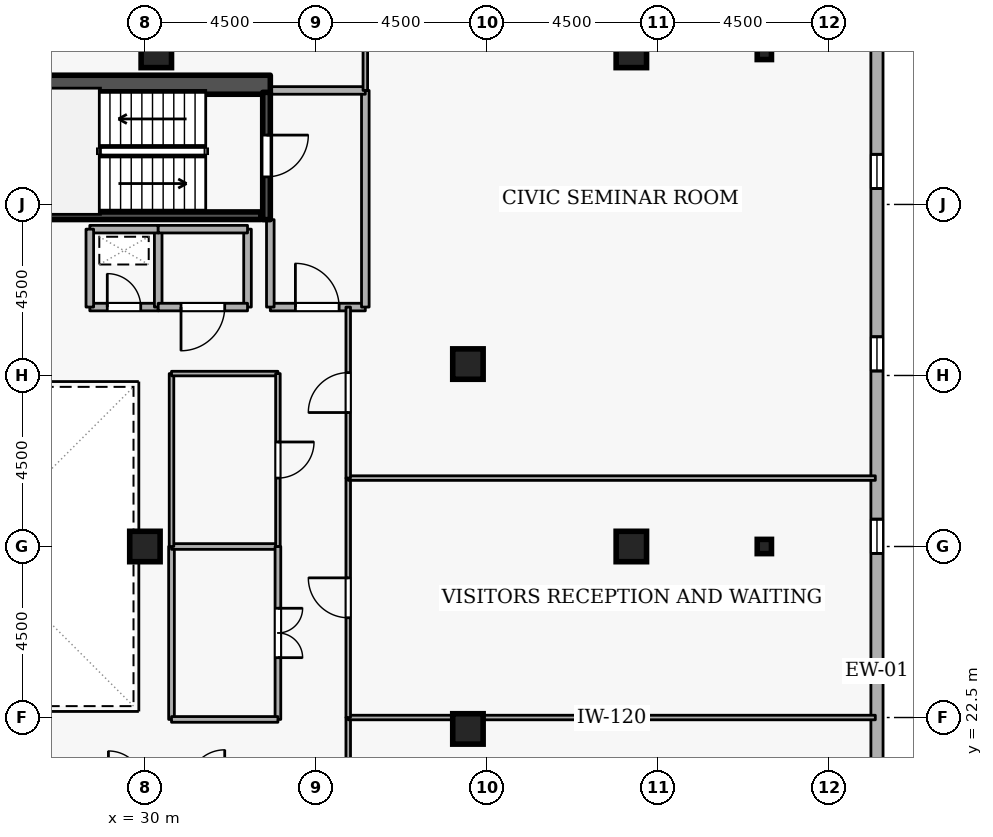
"""IFC4 building model, lengths in metres.
Left out: names, types, materials, properties, quantities, classifications, styles, units other than length and angle.
Written with IfcOpenShell. Run it as: python <this file> out.ifc"""

import sys

from ifc_helpers import new_model, si_unit, direction, frame, frame_2d, origin, origin_2d, place, context, subcontext, project, spatial, rectangle, i_section, extrude, element, fill, save


model = new_model("IFC4")
c1 = context("Model", 3, precision=1e-05, world=origin(), true_north=direction((0.0, 1.0)))
c2 = subcontext(c1, "Body", "Model", "MODEL_VIEW")
j1 = project(units=[si_unit("LENGTHUNIT", "METRE"), si_unit("PLANEANGLEUNIT", "RADIAN")], contexts=[c1])
p1 = place(None, origin())
s1 = spatial("IfcSite", under=j1, at=p1, CompositionType="ELEMENT")
p2 = place(p1, origin())
s2 = spatial("IfcBuilding", under=s1, at=p2, CompositionType="ELEMENT")
p3 = place(p2, frame((0.0, 0.0, 269.1)))
s3 = spatial("IfcBuildingStorey", under=s2, at=p3, CompositionType="ELEMENT", Elevation=269.1)
p4 = place(p3, frame((17.7, 39.15, 0.0), z_axis=(0.0, 0.0, 1.0), x_axis=(1.0, 0.0, 0.0)))
e1 = element("IfcWall", 1, at=p4, inside=s3, PredefinedType="SHEAR", context=c2, shape_type="SweptSolid", body=[
    extrude(rectangle(XDim=15.6, YDim=0.5, at=frame_2d((7.8, 0.0))), origin(), (0.0, 0.0, 1.0), 3.6),
])
for number, where, z_axis, x_axis in (
    (2, (42.8, 27.0, 0.0), (0.0, 0.0, 1.0), (1.0, 0.0, 0.0)),
    (3, (42.8, 40.0, 0.0), (0.0, 0.0, 1.0), (1.0, 0.0, 0.0)),
    (4, (38.5, 22.2, 0.0), (0.0, 0.0, 1.0), (1.0, 0.0, 0.0)),
    (5, (38.5, 31.8, 0.0), (0.0, 0.0, 1.0), (1.0, 0.0, 0.0)),
    (6, (30.3, 40.0, 0.0), (0.0, 0.0, 1.0), (1.0, 0.0, 0.0)),
    (7, (30.0, 27.0, 0.0), (0.0, 0.0, 1.0), (1.0, 0.0, 0.0)),
):
    element("IfcColumn", number, at=place(p3, frame(where, z_axis=z_axis, x_axis=x_axis)), inside=s3, PredefinedType="COLUMN", context=c2, shape_type="SweptSolid", body=[
        extrude(rectangle(XDim=0.8, YDim=0.8, at=origin_2d()), origin(), (0.0, 0.0, 1.0), 3.6),
    ])
for number, where, z_axis, x_axis in (
    (8, (46.3, 27.0, 0.0), (0.0, 0.0, 1.0), (1.0, 0.0, 0.0)),
    (9, (46.3, 40.0, 0.0), (0.0, 0.0, 1.0), (1.0, 0.0, 0.0)),
):
    element("IfcColumn", number, at=place(p3, frame(where, z_axis=z_axis, x_axis=x_axis)), inside=s3, PredefinedType="COLUMN", context=c2, shape_type="SweptSolid", body=[
        extrude(i_section(OverallWidth=0.375, OverallDepth=0.375, WebThickness=0.017, FlangeThickness=0.027, FilletRadius=0.015, at=origin_2d()), origin(), (0.0, 0.0, 1.0), 3.6),
    ])
p5 = place(p3, frame((49.265, 5.819, 0.0), z_axis=(0.0, 0.0, 1.0), x_axis=(-5.4540124e-05, 0.999999998513, 0.0)))
e10 = element("IfcWall", 10, at=p5, inside=s3, PredefinedType="STANDARD", context=c2, shape_type="SweptSolid", body=[
    extrude(rectangle(XDim=35.811, YDim=0.32, at=frame_2d((17.905, 0.0))), origin(), (0.0, 0.0, 1.0), 2.7),
])
p6 = place(p5, frame((1.8, 0.0, 0.72)))
e11 = element("IfcOpeningElement", 11, at=p6, cuts=e10, PredefinedType="OPENING", context=c2, shape_type="SweptSolid", body=[
    extrude(rectangle(XDim=0.9, YDim=1.75, at=frame_2d((0.45, 0.875))), frame((0.0, 0.17, 0.0), z_axis=(0.0, -1.0, 0.0), x_axis=(1.0, 0.0, 0.0)), (0.0, 0.0, 1.0), 0.34),
])
p7 = place(p5, frame((6.6, 0.0, 0.72)))
e12 = element("IfcOpeningElement", 12, at=p7, cuts=e10, PredefinedType="OPENING", context=c2, shape_type="SweptSolid", body=[
    extrude(rectangle(XDim=0.9, YDim=1.75, at=frame_2d((0.45, 0.875))), frame((0.0, 0.17, 0.0), z_axis=(0.0, -1.0, 0.0), x_axis=(1.0, 0.0, 0.0)), (0.0, 0.0, 1.0), 0.34),
])
p8 = place(p5, frame((11.4, 0.0, 0.72)))
e13 = element("IfcOpeningElement", 13, at=p8, cuts=e10, PredefinedType="OPENING", context=c2, shape_type="SweptSolid", body=[
    extrude(rectangle(XDim=0.9, YDim=1.75, at=frame_2d((0.45, 0.875))), frame((0.0, 0.17, 0.0), z_axis=(0.0, -1.0, 0.0), x_axis=(1.0, 0.0, 0.0)), (0.0, 0.0, 1.0), 0.34),
])
p9 = place(p5, frame((21.0, 0.0, 0.72)))
e14 = element("IfcOpeningElement", 14, at=p9, cuts=e10, PredefinedType="OPENING", context=c2, shape_type="SweptSolid", body=[
    extrude(rectangle(XDim=0.9, YDim=1.75, at=frame_2d((0.45, 0.875))), frame((0.0, 0.17, 0.0), z_axis=(0.0, -1.0, 0.0), x_axis=(1.0, 0.0, 0.0)), (0.0, 0.0, 1.0), 0.34),
])
p10 = place(p5, frame((25.8, 0.0, 0.72)))
e15 = element("IfcOpeningElement", 15, at=p10, cuts=e10, PredefinedType="OPENING", context=c2, shape_type="SweptSolid", body=[
    extrude(rectangle(XDim=0.9, YDim=1.75, at=frame_2d((0.45, 0.875))), frame((0.0, 0.17, 0.0), z_axis=(0.0, -1.0, 0.0), x_axis=(1.0, 0.0, 0.0)), (0.0, 0.0, 1.0), 0.34),
])
p11 = place(p5, frame((30.6, 0.0, 0.72)))
e16 = element("IfcOpeningElement", 16, at=p11, cuts=e10, PredefinedType="OPENING", context=c2, shape_type="SweptSolid", body=[
    extrude(rectangle(XDim=0.9, YDim=1.75, at=frame_2d((0.45, 0.875))), frame((0.0, 0.17, 0.0), z_axis=(0.0, -1.0, 0.0), x_axis=(1.0, 0.0, 0.0)), (0.0, 0.0, 1.0), 0.34),
])
p12 = place(p3, frame((33.2, 38.95, 0.0), z_axis=(0.0, 0.0, 1.0), x_axis=(0.0, -1.0, 0.0)))
e17 = element("IfcWall", 17, at=p12, inside=s3, PredefinedType="SHEAR", context=c2, shape_type="SweptSolid", body=[
    extrude(rectangle(XDim=3.35, YDim=0.2, at=frame_2d((1.675, 0.0))), origin(), (0.0, 0.0, 1.0), 3.6),
])
p13 = place(p12, frame((1.125, 0.0, 0.0)))
e18 = element("IfcOpeningElement", 18, at=p13, cuts=e17, PredefinedType="OPENING", context=c2, shape_type="SweptSolid", body=[
    extrude(rectangle(XDim=1.1, YDim=2.1, at=frame_2d((0.55, 1.05))), frame((0.0, 0.11, 0.0), z_axis=(0.0, -1.0, 0.0), x_axis=(1.0, 0.0, 0.0)), (0.0, 0.0, 1.0), 0.22),
])
p14 = place(p3, frame((25.95, 35.703, 0.0), z_axis=(0.0, 0.0, 1.0), x_axis=(1.0, 0.0, 0.0)))
e19 = element("IfcWall", 19, at=p14, inside=s3, PredefinedType="SHEAR", context=c2, shape_type="SweptSolid", body=[
    extrude(rectangle(XDim=7.1, YDim=0.2, at=frame_2d((3.55, 0.0))), origin(), (0.0, 0.0, 1.0), 3.6),
])
p15 = place(p3, frame((33.3, 33.3, 0.0), z_axis=(0.0, 0.0, 1.0), x_axis=(1.0, 0.0, 0.0)))
e20 = element("IfcWall", 20, at=p15, inside=s3, PredefinedType="STANDARD", context=c2, shape_type="SweptSolid", body=[
    extrude(rectangle(XDim=2.5, YDim=0.2, at=frame_2d((1.25, 0.0))), origin(), (0.0, 0.0, 1.0), 3.34),
])
p16 = place(p15, frame((0.66, 0.0, 0.0)))
e21 = element("IfcOpeningElement", 21, at=p16, cuts=e20, PredefinedType="OPENING", context=c2, shape_type="SweptSolid", body=[
    extrude(rectangle(XDim=1.15, YDim=2.1, at=frame_2d((0.575, 1.05))), frame((0.0, 0.11, 0.0), z_axis=(0.0, -1.0, 0.0), x_axis=(1.0, 0.0, 0.0)), (0.0, 0.0, 1.0), 0.22),
])
p17 = place(p3, frame((35.8, 33.3, 0.0), z_axis=(0.0, 0.0, 1.0), x_axis=(0.0, 1.0, 0.0)))
e22 = element("IfcWall", 22, at=p17, inside=s3, PredefinedType="STANDARD", context=c2, shape_type="SweptSolid", body=[
    extrude(rectangle(XDim=5.7, YDim=0.2, at=frame_2d((2.85, 0.0))), origin(), (0.0, 0.0, 1.0), 3.34),
])
p18 = place(p3, frame((35.8, 39.0, 0.0), z_axis=(0.0, 0.0, 1.0), x_axis=(-1.0, 0.0, 0.0)))
e23 = element("IfcWall", 23, at=p18, inside=s3, PredefinedType="STANDARD", context=c2, shape_type="SweptSolid", body=[
    extrude(rectangle(XDim=2.5, YDim=0.2, at=frame_2d((1.25, 0.0))), origin(), (0.0, 0.0, 1.0), 3.34),
])
p19 = place(p3, frame((33.3, 35.6, 0.0), z_axis=(0.0, 0.0, 1.0), x_axis=(0.0, -1.0, 0.0)))
e24 = element("IfcWall", 24, at=p19, inside=s3, PredefinedType="STANDARD", context=c2, shape_type="SweptSolid", body=[
    extrude(rectangle(XDim=2.3, YDim=0.2, at=frame_2d((1.15, 0.0))), origin(), (0.0, 0.0, 1.0), 2.545),
])
p20 = place(p3, frame((28.55, 33.3, 0.0), z_axis=(0.0, 0.0, 1.0), x_axis=(1.0, 0.0, 0.0)))
e25 = element("IfcWall", 25, at=p20, inside=s3, PredefinedType="STANDARD", context=c2, shape_type="SweptSolid", body=[
    extrude(rectangle(XDim=1.8, YDim=0.2, at=frame_2d((0.9, 0.0))), origin(), (0.0, 0.0, 1.0), 3.34),
])
p21 = place(p20, frame((0.46, 0.0, 0.0)))
e26 = element("IfcOpeningElement", 26, at=p21, cuts=e25, PredefinedType="OPENING", context=c2, shape_type="SweptSolid", body=[
    extrude(rectangle(XDim=0.88, YDim=2.04, at=frame_2d((0.44, 1.02))), frame((0.0, 0.11, 0.0), z_axis=(0.0, -1.0, 0.0), x_axis=(1.0, 0.0, 0.0)), (0.0, 0.0, 1.0), 0.22),
])
p22 = place(p3, frame((30.35, 33.3, 0.0), z_axis=(0.0, 0.0, 1.0), x_axis=(0.0, 1.0, 0.0)))
e27 = element("IfcWall", 27, at=p22, inside=s3, PredefinedType="STANDARD", context=c2, shape_type="SweptSolid", body=[
    extrude(rectangle(XDim=2.05, YDim=0.2, at=frame_2d((1.025, 0.0))), origin(), (0.0, 0.0, 1.0), 3.34),
])
p23 = place(p3, frame((30.35, 35.35, 0.0), z_axis=(0.0, 0.0, 1.0), x_axis=(-1.0, 0.0, 0.0)))
e28 = element("IfcWall", 28, at=p23, inside=s3, PredefinedType="STANDARD", context=c2, shape_type="SweptSolid", body=[
    extrude(rectangle(XDim=1.8, YDim=0.2, at=frame_2d((0.9, 0.0))), origin(), (0.0, 0.0, 1.0), 3.34),
])
p24 = place(p3, frame((28.55, 35.35, 0.0), z_axis=(0.0, 0.0, 1.0), x_axis=(0.0, -1.0, 0.0)))
e29 = element("IfcWall", 29, at=p24, inside=s3, PredefinedType="STANDARD", context=c2, shape_type="SweptSolid", body=[
    extrude(rectangle(XDim=2.05, YDim=0.2, at=frame_2d((1.025, 0.0))), origin(), (0.0, 0.0, 1.0), 3.34),
])
p25 = place(p3, frame((32.7, 35.35, 0.0), z_axis=(0.0, 0.0, 1.0), x_axis=(0.0, -1.0, 0.0)))
e30 = element("IfcWall", 30, at=p25, inside=s3, PredefinedType="STANDARD", context=c2, shape_type="SweptSolid", body=[
    extrude(rectangle(XDim=2.05, YDim=0.2, at=frame_2d((1.025, 0.0))), origin(), (0.0, 0.0, 1.0), 2.545),
])
p26 = place(p3, frame((32.7, 33.3, 0.0), z_axis=(0.0, 0.0, 1.0), x_axis=(-1.0, 0.0, 0.0)))
e31 = element("IfcWall", 31, at=p26, inside=s3, PredefinedType="STANDARD", context=c2, shape_type="SweptSolid", body=[
    extrude(rectangle(XDim=2.35, YDim=0.2, at=frame_2d((1.175, 0.0))), origin(), (0.0, 0.0, 1.0), 3.34),
])
p27 = place(p26, frame((0.6, 0.0, 0.0)))
e32 = element("IfcOpeningElement", 32, at=p27, cuts=e31, PredefinedType="OPENING", context=c2, shape_type="SweptSolid", body=[
    extrude(rectangle(XDim=1.15, YDim=2.1, at=frame_2d((0.575, 1.05))), frame((0.0, 0.11, 0.0), z_axis=(0.0, -1.0, 0.0), x_axis=(1.0, 0.0, 0.0)), (0.0, 0.0, 1.0), 0.22),
])
p28 = place(p3, frame((30.35, 35.35, 0.0), z_axis=(0.0, 0.0, 1.0), x_axis=(1.0, 0.0, 0.0)))
e33 = element("IfcWall", 33, at=p28, inside=s3, PredefinedType="STANDARD", context=c2, shape_type="SweptSolid", body=[
    extrude(rectangle(XDim=2.35, YDim=0.2, at=frame_2d((1.175, 0.0))), origin(), (0.0, 0.0, 1.0), 3.34),
])
p29 = place(p3, frame((35.35, 14.8, 0.0), z_axis=(0.0, 0.0, 1.0), x_axis=(0.0, 1.0, 0.0)))
e34 = element("IfcWall", 34, at=p29, inside=s3, PredefinedType="PARTITIONING", context=c2, shape_type="SweptSolid", body=[
    extrude(rectangle(XDim=7.7, YDim=0.12, at=frame_2d((3.85, 0.0))), origin(), (0.0, 0.0, 1.0), 3.34),
])
p30 = place(p29, frame((3.325, 0.0, 0.0)))
e35 = element("IfcOpeningElement", 35, at=p30, cuts=e34, PredefinedType="OPENING", context=c2, shape_type="SweptSolid", body=[
    extrude(rectangle(XDim=1.05, YDim=2.1, at=frame_2d((0.525, 1.05))), frame((0.0, 0.07, 0.0), z_axis=(0.0, -1.0, 0.0), x_axis=(1.0, 0.0, 0.0)), (0.0, 0.0, 1.0), 0.14),
])
p31 = place(p3, frame((35.35, 22.5, 0.0), z_axis=(0.0, 0.0, 1.0), x_axis=(1.0, 0.0, 0.0)))
e36 = element("IfcWall", 36, at=p31, inside=s3, PredefinedType="PARTITIONING", context=c2, shape_type="SweptSolid", body=[
    extrude(rectangle(XDim=13.87, YDim=0.12, at=frame_2d((6.935, 0.0))), origin(), (0.0, 0.0, 1.0), 3.34),
])
p32 = place(p3, frame((35.35, 22.5, 0.0), z_axis=(0.0, 0.0, 1.0), x_axis=(0.0, 1.0, 0.0)))
e37 = element("IfcWall", 37, at=p32, inside=s3, PredefinedType="PARTITIONING", context=c2, shape_type="SweptSolid", body=[
    extrude(rectangle(XDim=6.3, YDim=0.12, at=frame_2d((3.15, 0.0))), origin(), (0.0, 0.0, 1.0), 3.34),
])
p33 = place(p32, frame((2.625, 0.0, 0.0)))
e38 = element("IfcOpeningElement", 38, at=p33, cuts=e37, PredefinedType="OPENING", context=c2, shape_type="SweptSolid", body=[
    extrude(rectangle(XDim=1.05, YDim=2.1, at=frame_2d((0.525, 1.05))), frame((0.0, 0.07, 0.0), z_axis=(0.0, -1.0, 0.0), x_axis=(1.0, 0.0, 0.0)), (0.0, 0.0, 1.0), 0.14),
])
p34 = place(p3, frame((35.35, 28.8, 0.0), z_axis=(0.0, 0.0, 1.0), x_axis=(1.0, 0.0, 0.0)))
e39 = element("IfcWall", 39, at=p34, inside=s3, PredefinedType="PARTITIONING", context=c2, shape_type="SweptSolid", body=[
    extrude(rectangle(XDim=13.87, YDim=0.12, at=frame_2d((6.935, 0.0))), origin(), (0.0, 0.0, 1.0), 3.34),
])
p35 = place(p3, frame((35.8, 39.0, 0.0), z_axis=(0.0, 0.0, 1.0), x_axis=(0.0, 1.0, 0.0)))
e40 = element("IfcWall", 40, at=p35, inside=s3, PredefinedType="PARTITIONING", context=c2, shape_type="SweptSolid", body=[
    extrude(rectangle(XDim=5.72, YDim=0.12, at=frame_2d((2.86, 0.0))), origin(), (0.0, 0.0, 1.0), 3.34),
])
p36 = place(p3, frame((35.35, 28.8, 0.0), z_axis=(0.0, 0.0, 1.0), x_axis=(0.0, 1.0, 0.0)))
e41 = element("IfcWall", 41, at=p36, inside=s3, PredefinedType="PARTITIONING", context=c2, shape_type="SweptSolid", body=[
    extrude(rectangle(XDim=4.5, YDim=0.12, at=frame_2d((2.25, 0.0))), origin(), (0.0, 0.0, 1.0), 3.34),
])
p37 = place(p36, frame((1.725, 0.0, 0.0)))
e42 = element("IfcOpeningElement", 42, at=p37, cuts=e41, PredefinedType="OPENING", context=c2, shape_type="SweptSolid", body=[
    extrude(rectangle(XDim=1.05, YDim=2.1, at=frame_2d((0.525, 1.05))), frame((0.0, 0.07, 0.0), z_axis=(0.0, -1.0, 0.0), x_axis=(1.0, 0.0, 0.0)), (0.0, 0.0, 1.0), 0.14),
])
p38 = place(p3, frame((30.7, 22.45, 0.0), z_axis=(0.0, 0.0, 1.0), x_axis=(0.0, 1.0, 0.0)))
e43 = element("IfcWall", 43, at=p38, inside=s3, PredefinedType="PARTITIONING", context=c2, shape_type="SweptSolid", body=[
    extrude(rectangle(XDim=4.55, YDim=0.15, at=frame_2d((2.275, 0.0))), origin(), (0.0, 0.0, 1.0), 3.34),
])
p39 = place(p3, frame((30.7, 27.0, 0.0), z_axis=(0.0, 0.0, 1.0), x_axis=(1.0, 0.0, 0.0)))
e44 = element("IfcWall", 44, at=p39, inside=s3, PredefinedType="PARTITIONING", context=c2, shape_type="SweptSolid", body=[
    extrude(rectangle(XDim=2.8, YDim=0.15, at=frame_2d((1.4, 0.0))), origin(), (0.0, 0.0, 1.0), 3.34),
])
p40 = place(p3, frame((33.5, 27.0, 0.0), z_axis=(0.0, 0.0, 1.0), x_axis=(0.0, -1.0, 0.0)))
e45 = element("IfcWall", 45, at=p40, inside=s3, PredefinedType="PARTITIONING", context=c2, shape_type="SweptSolid", body=[
    extrude(rectangle(XDim=4.55, YDim=0.15, at=frame_2d((2.275, 0.0))), origin(), (0.0, 0.0, 1.0), 3.34),
])
p41 = place(p40, frame((1.625, 0.0, 0.0)))
e46 = element("IfcOpeningElement", 46, at=p41, cuts=e45, PredefinedType="OPENING", context=c2, shape_type="SweptSolid", body=[
    extrude(rectangle(XDim=1.3, YDim=2.12, at=frame_2d((0.65, 1.06))), frame((0.0, 0.085, 0.0), z_axis=(0.0, -1.0, 0.0), x_axis=(1.0, 0.0, 0.0)), (0.0, 0.0, 1.0), 0.17),
])
p42 = place(p3, frame((33.5, 22.45, 0.0), z_axis=(0.0, 0.0, 1.0), x_axis=(-1.0, 0.0, 0.0)))
e47 = element("IfcWall", 47, at=p42, inside=s3, PredefinedType="PARTITIONING", context=c2, shape_type="SweptSolid", body=[
    extrude(rectangle(XDim=2.8, YDim=0.15, at=frame_2d((1.4, 0.0))), origin(), (0.0, 0.0, 1.0), 3.34),
])
p43 = place(p3, frame((30.7, 27.0, 0.0), z_axis=(0.0, 0.0, 1.0), x_axis=(0.0, 1.0, 0.0)))
e48 = element("IfcWall", 48, at=p43, inside=s3, PredefinedType="PARTITIONING", context=c2, shape_type="SweptSolid", body=[
    extrude(rectangle(XDim=4.55, YDim=0.12, at=frame_2d((2.275, 0.0))), origin(), (0.0, 0.0, 1.0), 3.34),
])
p44 = place(p3, frame((30.7, 31.55, 0.0), z_axis=(0.0, 0.0, 1.0), x_axis=(1.0, 0.0, 0.0)))
e49 = element("IfcWall", 49, at=p44, inside=s3, PredefinedType="PARTITIONING", context=c2, shape_type="SweptSolid", body=[
    extrude(rectangle(XDim=2.8, YDim=0.12, at=frame_2d((1.4, 0.0))), origin(), (0.0, 0.0, 1.0), 3.34),
])
p45 = place(p3, frame((33.5, 31.55, 0.0), z_axis=(0.0, 0.0, 1.0), x_axis=(0.0, -1.0, 0.0)))
e50 = element("IfcWall", 50, at=p45, inside=s3, PredefinedType="PARTITIONING", context=c2, shape_type="SweptSolid", body=[
    extrude(rectangle(XDim=4.55, YDim=0.12, at=frame_2d((2.275, 0.0))), origin(), (0.0, 0.0, 1.0), 3.34),
])
p46 = place(p45, frame((1.8, 0.0, 0.0)))
e51 = element("IfcOpeningElement", 51, at=p46, cuts=e50, PredefinedType="OPENING", context=c2, shape_type="SweptSolid", body=[
    extrude(rectangle(XDim=0.95, YDim=2.1, at=frame_2d((0.475, 1.05))), frame((0.0, 0.07, 0.0), z_axis=(0.0, -1.0, 0.0), x_axis=(1.0, 0.0, 0.0)), (0.0, 0.0, 1.0), 0.14),
])
p47 = place(p9, origin())
e52 = element("IfcWindow", 52, at=p47, inside=s3, PartitioningType="SINGLE_PANEL", PredefinedType="WINDOW", context=c2, shape_type="SweptSolid", body=[
    extrude(rectangle(XDim=0.9, YDim=1.75, at=frame_2d((0.45, 0.875))), frame((0.0, 0.03, 0.0), z_axis=(0.0, -1.0, 0.0), x_axis=(1.0, 0.0, 0.0)), (0.0, 0.0, 1.0), 0.06),
])
fill(e14, e52)
p48 = place(p10, origin())
e53 = element("IfcWindow", 53, at=p48, inside=s3, PartitioningType="SINGLE_PANEL", PredefinedType="WINDOW", context=c2, shape_type="SweptSolid", body=[
    extrude(rectangle(XDim=0.9, YDim=1.75, at=frame_2d((0.45, 0.875))), frame((0.0, 0.03, 0.0), z_axis=(0.0, -1.0, 0.0), x_axis=(1.0, 0.0, 0.0)), (0.0, 0.0, 1.0), 0.06),
])
fill(e15, e53)
p49 = place(p11, origin())
e54 = element("IfcWindow", 54, at=p49, inside=s3, PartitioningType="SINGLE_PANEL", PredefinedType="WINDOW", context=c2, shape_type="SweptSolid", body=[
    extrude(rectangle(XDim=0.9, YDim=1.75, at=frame_2d((0.45, 0.875))), frame((0.0, 0.03, 0.0), z_axis=(0.0, -1.0, 0.0), x_axis=(1.0, 0.0, 0.0)), (0.0, 0.0, 1.0), 0.06),
])
fill(e16, e54)
p50 = place(p13, origin())
e55 = element("IfcDoor", 55, at=p50, inside=s3, OperationType="SINGLE_SWING_LEFT", PredefinedType="DOOR", context=c2, shape_type="SweptSolid", body=[
    extrude(rectangle(XDim=1.1, YDim=2.1, at=frame_2d((0.55, 1.05))), frame((0.0, 0.025, 0.0), z_axis=(0.0, -1.0, 0.0), x_axis=(1.0, 0.0, 0.0)), (0.0, 0.0, 1.0), 0.05),
])
fill(e18, e55)
p51 = place(p16, origin())
e56 = element("IfcDoor", 56, at=p51, inside=s3, OperationType="SINGLE_SWING_LEFT", PredefinedType="DOOR", context=c2, shape_type="SweptSolid", body=[
    extrude(rectangle(XDim=1.15, YDim=2.1, at=frame_2d((0.575, 1.05))), frame((0.0, 0.025, 0.0), z_axis=(0.0, -1.0, 0.0), x_axis=(1.0, 0.0, 0.0)), (0.0, 0.0, 1.0), 0.05),
])
fill(e21, e56)
p52 = place(p21, origin())
e57 = element("IfcDoor", 57, at=p52, inside=s3, OperationType="SINGLE_SWING_LEFT", PredefinedType="DOOR", context=c2, shape_type="SweptSolid", body=[
    extrude(rectangle(XDim=0.88, YDim=2.04, at=frame_2d((0.44, 1.02))), frame((0.0, 0.025, 0.0), z_axis=(0.0, -1.0, 0.0), x_axis=(1.0, 0.0, 0.0)), (0.0, 0.0, 1.0), 0.05),
])
fill(e26, e57)
p53 = place(p27, origin())
e58 = element("IfcDoor", 58, at=p53, inside=s3, OperationType="SINGLE_SWING_RIGHT", PredefinedType="DOOR", context=c2, shape_type="SweptSolid", body=[
    extrude(rectangle(XDim=1.15, YDim=2.1, at=frame_2d((0.575, 1.05))), frame((0.0, 0.025, 0.0), z_axis=(0.0, -1.0, 0.0), x_axis=(1.0, 0.0, 0.0)), (0.0, 0.0, 1.0), 0.05),
])
fill(e32, e58)
p54 = place(p33, origin())
e59 = element("IfcDoor", 59, at=p54, inside=s3, OperationType="SINGLE_SWING_RIGHT", PredefinedType="DOOR", context=c2, shape_type="SweptSolid", body=[
    extrude(rectangle(XDim=1.05, YDim=2.1, at=frame_2d((0.525, 1.05))), frame((0.0, 0.025, 0.0), z_axis=(0.0, -1.0, 0.0), x_axis=(1.0, 0.0, 0.0)), (0.0, 0.0, 1.0), 0.05),
])
fill(e38, e59)
p55 = place(p37, origin())
e60 = element("IfcDoor", 60, at=p55, inside=s3, OperationType="SINGLE_SWING_LEFT", PredefinedType="DOOR", context=c2, shape_type="SweptSolid", body=[
    extrude(rectangle(XDim=1.05, YDim=2.1, at=frame_2d((0.525, 1.05))), frame((0.0, 0.025, 0.0), z_axis=(0.0, -1.0, 0.0), x_axis=(1.0, 0.0, 0.0)), (0.0, 0.0, 1.0), 0.05),
])
fill(e42, e60)
p56 = place(p41, origin())
e61 = element("IfcDoor", 61, at=p56, inside=s3, OperationType="DOUBLE_DOOR_SINGLE_SWING", PredefinedType="DOOR", context=c2, shape_type="SweptSolid", body=[
    extrude(rectangle(XDim=1.3, YDim=2.12, at=frame_2d((0.65, 1.06))), frame((0.0, 0.025, 0.0), z_axis=(0.0, -1.0, 0.0), x_axis=(1.0, 0.0, 0.0)), (0.0, 0.0, 1.0), 0.05),
])
fill(e46, e61)
p57 = place(p46, origin())
e62 = element("IfcDoor", 62, at=p57, inside=s3, OperationType="SINGLE_SWING_LEFT", PredefinedType="DOOR", context=c2, shape_type="SweptSolid", body=[
    extrude(rectangle(XDim=0.95, YDim=2.1, at=frame_2d((0.475, 1.05))), frame((0.0, 0.025, 0.0), z_axis=(0.0, -1.0, 0.0), x_axis=(1.0, 0.0, 0.0)), (0.0, 0.0, 1.0), 0.05),
])
fill(e51, e62)
save(model, sys.argv[1])
